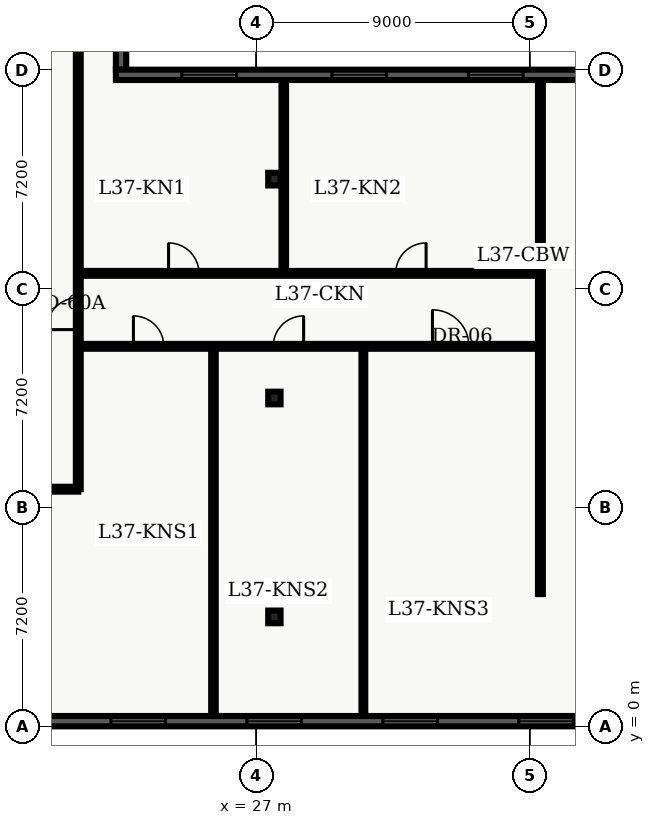
"""IFC4 building model, lengths in metres.
Left out: names, types, materials, properties, quantities, classifications, styles, units other than length and angle.
Written with IfcOpenShell. Run it as: python <this file> out.ifc"""

import sys

from ifc_helpers import new_model, entity, si_unit, converted_unit, direction, frame, origin_with_axes, origin_2d_with_axis, place, context, subcontext, project, spatial, polyline, rectangle, i_section, outline, extrude, element, fill, save


model = new_model("IFC4")
c1 = context("Model", 3, precision=1e-05, world=origin_with_axes(), true_north=direction((0.0, 1.0)))
c2 = subcontext(c1, "Body", "Model", "MODEL_VIEW")
j1 = project(units=[si_unit("LENGTHUNIT", "METRE"), converted_unit("PLANEANGLEUNIT", "DEGREE", entity("IfcPlaneAngleMeasure", 0.017), si_unit("PLANEANGLEUNIT", "RADIAN"), dimensions=[0, 0, 0, 0, 0, 0, 0])], contexts=[c1])
p1 = place(None, origin_with_axes())
s1 = spatial("IfcSite", under=j1, at=p1, CompositionType="ELEMENT")
p2 = place(p1, origin_with_axes())
s2 = spatial("IfcBuilding", under=s1, at=p2, CompositionType="ELEMENT")
p3 = place(p2, frame((0.0, 0.0, 152.4), z_axis=(0.0, 0.0, 1.0), x_axis=(1.0, 0.0, 0.0)))
s3 = spatial("IfcBuildingStorey", under=s2, at=p3, CompositionType="ELEMENT", Elevation=152.4)
for number, where, z_axis, x_axis in (
    (1, (27.6, 3.6, 0.0), (0.0, 0.0, 1.0), (1.0, 0.0, 0.0)),
    (2, (27.6, 10.8, 0.0), (0.0, 0.0, 1.0), (1.0, 0.0, 0.0)),
    (3, (27.6, 18.0, 0.0), (0.0, 0.0, 1.0), (1.0, 0.0, 0.0)),
):
    element("IfcColumn", number, at=place(p3, frame(where, z_axis=z_axis, x_axis=x_axis)), inside=s3, PredefinedType="COLUMN", context=c2, shape_type="SweptSolid", body=[
        extrude(i_section(OverallWidth=0.406, OverallDepth=0.416, WebThickness=0.03, FlangeThickness=0.048, FilletRadius=0.022, at=origin_2d_with_axis()), origin_with_axes(), (0.0, 0.0, 1.0), 3.9),
    ])
p4 = place(p3, frame((2.6, 7.8, 0.0), z_axis=(0.0, 0.0, 1.0), x_axis=(1.0, 0.0, 0.0)))
e4 = element("IfcWall", 4, at=p4, inside=s3, PredefinedType="PARTITIONING", context=c2, shape_type="SweptSolid", body=[
    extrude(outline(polyline([(0.0, -0.08), (18.55, -0.08), (18.55, 0.08), (0.0, 0.08), (0.0, -0.08)])), origin_with_axes(), (0.0, 0.0, 1.0), 2.7),
])
p5 = place(p4, frame((3.787, 0.0, 0.0), z_axis=(0.0, 0.0, 1.0), x_axis=(1.0, 0.0, 0.0)))
e5 = element("IfcOpeningElement", 5, at=p5, cuts=e4, PredefinedType="OPENING", context=c2, shape_type="SweptSolid", body=[
    extrude(rectangle(XDim=1.0, YDim=0.18, at=origin_2d_with_axis()), origin_with_axes(), (0.0, 0.0, 1.0), 2.15),
])
p6 = place(p4, frame((13.322, 0.0, 0.0), z_axis=(0.0, 0.0, 1.0), x_axis=(1.0, 0.0, 0.0)))
e6 = element("IfcOpeningElement", 6, at=p6, cuts=e4, PredefinedType="OPENING", context=c2, shape_type="SweptSolid", body=[
    extrude(rectangle(XDim=1.0, YDim=0.18, at=origin_2d_with_axis()), origin_with_axes(), (0.0, 0.0, 1.0), 2.15),
])
p7 = place(p3, frame((21.15, 7.8, 0.0), z_axis=(0.0, 0.0, 1.0), x_axis=(0.0, 1.0, 0.0)))
e7 = element("IfcWall", 7, at=p7, inside=s3, PredefinedType="PARTITIONING", context=c2, shape_type="SweptSolid", body=[
    extrude(outline(polyline([(0.0, -0.08), (32.7, -0.08), (32.7, 0.08), (0.0, 0.08), (0.0, -0.08)])), origin_with_axes(), (0.0, 0.0, 1.0), 2.7),
])
p8 = place(p7, frame((5.775, 0.0, 0.0), z_axis=(0.0, 0.0, 1.0), x_axis=(1.0, 0.0, 0.0)))
e8 = element("IfcOpeningElement", 8, at=p8, cuts=e7, PredefinedType="OPENING", context=c2, shape_type="SweptSolid", body=[
    extrude(rectangle(XDim=1.05, YDim=0.18, at=origin_2d_with_axis()), origin_with_axes(), (0.0, 0.0, 1.0), 2.15),
])
p9 = place(p3, frame((21.15, 12.5, 0.0), z_axis=(0.0, 0.0, 1.0), x_axis=(1.0, 0.0, 0.0)))
e9 = element("IfcWall", 9, at=p9, inside=s3, PredefinedType="PARTITIONING", context=c2, shape_type="SweptSolid", body=[
    extrude(outline(polyline([(0.0, -0.08), (15.2, -0.08), (15.2, 0.08), (0.0, 0.08), (0.0, -0.08)])), origin_with_axes(), (0.0, 0.0, 1.0), 2.7),
])
p10 = place(p9, frame((2.313, 0.0, 0.0), z_axis=(0.0, 0.0, 1.0), x_axis=(1.0, 0.0, 0.0)))
e10 = element("IfcOpeningElement", 10, at=p10, cuts=e9, PredefinedType="OPENING", context=c2, shape_type="SweptSolid", body=[
    extrude(rectangle(XDim=1.0, YDim=0.18, at=origin_2d_with_axis()), origin_with_axes(), (0.0, 0.0, 1.0), 2.15),
])
p11 = place(p9, frame((6.912, 0.0, 0.0), z_axis=(0.0, 0.0, 1.0), x_axis=(1.0, 0.0, 0.0)))
e11 = element("IfcOpeningElement", 11, at=p11, cuts=e9, PredefinedType="OPENING", context=c2, shape_type="SweptSolid", body=[
    extrude(rectangle(XDim=1.0, YDim=0.18, at=origin_2d_with_axis()), origin_with_axes(), (0.0, 0.0, 1.0), 2.15),
])
p12 = place(p9, frame((12.248, 0.0, 0.0), z_axis=(0.0, 0.0, 1.0), x_axis=(1.0, 0.0, 0.0)))
e12 = element("IfcOpeningElement", 12, at=p12, cuts=e9, PredefinedType="OPENING", context=c2, shape_type="SweptSolid", body=[
    extrude(rectangle(XDim=1.2, YDim=0.18, at=origin_2d_with_axis()), origin_with_axes(), (0.0, 0.0, 1.0), 2.2),
])
p13 = place(p3, frame((21.15, 14.9, 0.0), z_axis=(0.0, 0.0, 1.0), x_axis=(1.0, 0.0, 0.0)))
e13 = element("IfcWall", 13, at=p13, inside=s3, PredefinedType="PARTITIONING", context=c2, shape_type="SweptSolid", body=[
    extrude(outline(polyline([(0.0, -0.08), (15.2, -0.08), (15.2, 0.08), (0.0, 0.08), (0.0, -0.08)])), origin_with_axes(), (0.0, 0.0, 1.0), 2.7),
])
p14 = place(p13, frame((3.47, 0.0, 0.0), z_axis=(0.0, 0.0, 1.0), x_axis=(1.0, 0.0, 0.0)))
e14 = element("IfcOpeningElement", 14, at=p14, cuts=e13, PredefinedType="OPENING", context=c2, shape_type="SweptSolid", body=[
    extrude(rectangle(XDim=1.0, YDim=0.18, at=origin_2d_with_axis()), origin_with_axes(), (0.0, 0.0, 1.0), 2.15),
])
p15 = place(p13, frame((10.94, 0.0, 0.0), z_axis=(0.0, 0.0, 1.0), x_axis=(1.0, 0.0, 0.0)))
e15 = element("IfcOpeningElement", 15, at=p15, cuts=e13, PredefinedType="OPENING", context=c2, shape_type="SweptSolid", body=[
    extrude(rectangle(XDim=1.0, YDim=0.18, at=origin_2d_with_axis()), origin_with_axes(), (0.0, 0.0, 1.0), 2.15),
])
p16 = place(p3, frame((36.35, 4.35, 0.0), z_axis=(0.0, 0.0, 1.0), x_axis=(0.0, 1.0, 0.0)))
e16 = element("IfcWall", 16, at=p16, inside=s3, PredefinedType="PARTITIONING", context=c2, shape_type="SweptSolid", body=[
    extrude(outline(polyline([(0.0, -0.08), (16.95, -0.08), (16.95, 0.08), (0.0, 0.08), (0.0, -0.08)])), origin_with_axes(), (0.0, 0.0, 1.0), 2.7),
])
p17 = place(p3, frame((25.596, 0.335, 0.0), z_axis=(0.0, 0.0, 1.0), x_axis=(0.0, 1.0, 0.0)))
e17 = element("IfcWall", 17, at=p17, inside=s3, PredefinedType="PARTITIONING", context=c2, shape_type="SweptSolid", body=[
    extrude(outline(polyline([(0.0, -0.075), (12.045, -0.075), (12.045, 0.075), (0.0, 0.075), (0.0, -0.075)])), origin_with_axes(), (0.0, 0.0, 1.0), 2.7),
])
p18 = place(p3, frame((30.527, 0.335, 0.0), z_axis=(0.0, 0.0, 1.0), x_axis=(0.0, 1.0, 0.0)))
e18 = element("IfcWall", 18, at=p18, inside=s3, PredefinedType="PARTITIONING", context=c2, shape_type="SweptSolid", body=[
    extrude(outline(polyline([(0.0, -0.062), (12.045, -0.062), (12.045, 0.062), (0.0, 0.062), (0.0, -0.062)])), origin_with_axes(), (0.0, 0.0, 1.0), 2.7),
])
p19 = place(p3, frame((27.909, 15.02, 0.0), z_axis=(0.0, 0.0, 1.0), x_axis=(0.0, 1.0, 0.0)))
e19 = element("IfcWall", 19, at=p19, inside=s3, PredefinedType="PARTITIONING", context=c2, shape_type="SweptSolid", body=[
    extrude(outline(polyline([(0.0, -0.075), (6.245, -0.075), (6.245, 0.075), (0.0, 0.075), (0.0, -0.075)])), origin_with_axes(), (0.0, 0.0, 1.0), 2.7),
])
p20 = place(p3, frame((57.26, 0.17, 0.0), z_axis=(0.0, 0.0, 1.0), x_axis=(-1.0, 0.0, 0.0)))
e20 = element("IfcWall", 20, at=p20, inside=s3, PredefinedType="SOLIDWALL", context=c2, shape_type="SweptSolid", body=[
    extrude(outline(polyline([(0.0, -0.17), (54.86, -0.17), (54.86, 0.17), (0.0, 0.17), (0.0, -0.17)])), origin_with_axes(), (0.0, 0.0, 1.0), 3.66),
])
p21 = place(p20, frame((2.836, 0.0, 0.45), z_axis=(0.0, 0.0, 1.0), x_axis=(1.0, 0.0, 0.0)))
e21 = element("IfcOpeningElement", 21, at=p21, cuts=e20, PredefinedType="OPENING", context=c2, shape_type="SweptSolid", body=[
    extrude(rectangle(XDim=1.8, YDim=0.36, at=origin_2d_with_axis()), origin_with_axes(), (0.0, 0.0, 1.0), 2.1),
])
p22 = place(p20, frame((7.307, 0.0, 0.45), z_axis=(0.0, 0.0, 1.0), x_axis=(1.0, 0.0, 0.0)))
e22 = element("IfcOpeningElement", 22, at=p22, cuts=e20, PredefinedType="OPENING", context=c2, shape_type="SweptSolid", body=[
    extrude(rectangle(XDim=1.8, YDim=0.36, at=origin_2d_with_axis()), origin_with_axes(), (0.0, 0.0, 1.0), 2.1),
])
p23 = place(p20, frame((11.779, 0.0, 0.45), z_axis=(0.0, 0.0, 1.0), x_axis=(1.0, 0.0, 0.0)))
e23 = element("IfcOpeningElement", 23, at=p23, cuts=e20, PredefinedType="OPENING", context=c2, shape_type="SweptSolid", body=[
    extrude(rectangle(XDim=1.8, YDim=0.36, at=origin_2d_with_axis()), origin_with_axes(), (0.0, 0.0, 1.0), 2.1),
])
p24 = place(p20, frame((16.251, 0.0, 0.45), z_axis=(0.0, 0.0, 1.0), x_axis=(1.0, 0.0, 0.0)))
e24 = element("IfcOpeningElement", 24, at=p24, cuts=e20, PredefinedType="OPENING", context=c2, shape_type="SweptSolid", body=[
    extrude(rectangle(XDim=1.8, YDim=0.36, at=origin_2d_with_axis()), origin_with_axes(), (0.0, 0.0, 1.0), 2.1),
])
p25 = place(p20, frame((20.723, 0.0, 0.45), z_axis=(0.0, 0.0, 1.0), x_axis=(1.0, 0.0, 0.0)))
e25 = element("IfcOpeningElement", 25, at=p25, cuts=e20, PredefinedType="OPENING", context=c2, shape_type="SweptSolid", body=[
    extrude(rectangle(XDim=1.8, YDim=0.36, at=origin_2d_with_axis()), origin_with_axes(), (0.0, 0.0, 1.0), 2.1),
])
p26 = place(p20, frame((25.194, 0.0, 0.45), z_axis=(0.0, 0.0, 1.0), x_axis=(1.0, 0.0, 0.0)))
e26 = element("IfcOpeningElement", 26, at=p26, cuts=e20, PredefinedType="OPENING", context=c2, shape_type="SweptSolid", body=[
    extrude(rectangle(XDim=1.8, YDim=0.36, at=origin_2d_with_axis()), origin_with_axes(), (0.0, 0.0, 1.0), 2.1),
])
p27 = place(p20, frame((29.666, 0.0, 0.45), z_axis=(0.0, 0.0, 1.0), x_axis=(1.0, 0.0, 0.0)))
e27 = element("IfcOpeningElement", 27, at=p27, cuts=e20, PredefinedType="OPENING", context=c2, shape_type="SweptSolid", body=[
    extrude(rectangle(XDim=1.8, YDim=0.36, at=origin_2d_with_axis()), origin_with_axes(), (0.0, 0.0, 1.0), 2.1),
])
p28 = place(p20, frame((34.138, 0.0, 0.45), z_axis=(0.0, 0.0, 1.0), x_axis=(1.0, 0.0, 0.0)))
e28 = element("IfcOpeningElement", 28, at=p28, cuts=e20, PredefinedType="OPENING", context=c2, shape_type="SweptSolid", body=[
    extrude(rectangle(XDim=1.8, YDim=0.36, at=origin_2d_with_axis()), origin_with_axes(), (0.0, 0.0, 1.0), 2.1),
])
p29 = place(p20, frame((38.609, 0.0, 0.45), z_axis=(0.0, 0.0, 1.0), x_axis=(1.0, 0.0, 0.0)))
e29 = element("IfcOpeningElement", 29, at=p29, cuts=e20, PredefinedType="OPENING", context=c2, shape_type="SweptSolid", body=[
    extrude(rectangle(XDim=1.8, YDim=0.36, at=origin_2d_with_axis()), origin_with_axes(), (0.0, 0.0, 1.0), 2.1),
])
p30 = place(p20, frame((43.081, 0.0, 0.45), z_axis=(0.0, 0.0, 1.0), x_axis=(1.0, 0.0, 0.0)))
e30 = element("IfcOpeningElement", 30, at=p30, cuts=e20, PredefinedType="OPENING", context=c2, shape_type="SweptSolid", body=[
    extrude(rectangle(XDim=1.8, YDim=0.36, at=origin_2d_with_axis()), origin_with_axes(), (0.0, 0.0, 1.0), 2.1),
])
p31 = place(p20, frame((48.003, 0.0, 0.45), z_axis=(0.0, 0.0, 1.0), x_axis=(1.0, 0.0, 0.0)))
e31 = element("IfcOpeningElement", 31, at=p31, cuts=e20, PredefinedType="OPENING", context=c2, shape_type="SweptSolid", body=[
    extrude(rectangle(XDim=1.8, YDim=0.36, at=origin_2d_with_axis()), origin_with_axes(), (0.0, 0.0, 1.0), 2.1),
])
p32 = place(p20, frame((52.024, 0.0, 0.45), z_axis=(0.0, 0.0, 1.0), x_axis=(1.0, 0.0, 0.0)))
e32 = element("IfcOpeningElement", 32, at=p32, cuts=e20, PredefinedType="OPENING", context=c2, shape_type="SweptSolid", body=[
    extrude(rectangle(XDim=1.8, YDim=0.36, at=origin_2d_with_axis()), origin_with_axes(), (0.0, 0.0, 1.0), 2.1),
])
p33 = place(p3, frame((22.557, 46.1, 0.0), z_axis=(0.0, 0.0, 1.0), x_axis=(0.0, -1.0, 0.0)))
e33 = element("IfcWall", 33, at=p33, inside=s3, PredefinedType="SOLIDWALL", context=c2, shape_type="SweptSolid", body=[
    extrude(outline(polyline([(0.0, -0.17), (24.5, -0.17), (24.5, 0.17), (0.0, 0.17), (0.0, -0.17)])), origin_with_axes(), (0.0, 0.0, 1.0), 3.66),
])
p34 = place(p33, frame((2.93, 0.0, 0.45), z_axis=(0.0, 0.0, 1.0), x_axis=(1.0, 0.0, 0.0)))
e34 = element("IfcOpeningElement", 34, at=p34, cuts=e33, PredefinedType="OPENING", context=c2, shape_type="SweptSolid", body=[
    extrude(rectangle(XDim=1.6, YDim=0.36, at=origin_2d_with_axis()), origin_with_axes(), (0.0, 0.0, 1.0), 2.2),
])
p35 = place(p33, frame((7.59, 0.0, 0.45), z_axis=(0.0, 0.0, 1.0), x_axis=(1.0, 0.0, 0.0)))
e35 = element("IfcOpeningElement", 35, at=p35, cuts=e33, PredefinedType="OPENING", context=c2, shape_type="SweptSolid", body=[
    extrude(rectangle(XDim=1.6, YDim=0.36, at=origin_2d_with_axis()), origin_with_axes(), (0.0, 0.0, 1.0), 2.2),
])
p36 = place(p33, frame((12.25, 0.0, 0.45), z_axis=(0.0, 0.0, 1.0), x_axis=(1.0, 0.0, 0.0)))
e36 = element("IfcOpeningElement", 36, at=p36, cuts=e33, PredefinedType="OPENING", context=c2, shape_type="SweptSolid", body=[
    extrude(rectangle(XDim=1.6, YDim=0.36, at=origin_2d_with_axis()), origin_with_axes(), (0.0, 0.0, 1.0), 2.2),
])
p37 = place(p33, frame((16.91, 0.0, 0.45), z_axis=(0.0, 0.0, 1.0), x_axis=(1.0, 0.0, 0.0)))
e37 = element("IfcOpeningElement", 37, at=p37, cuts=e33, PredefinedType="OPENING", context=c2, shape_type="SweptSolid", body=[
    extrude(rectangle(XDim=1.6, YDim=0.36, at=origin_2d_with_axis()), origin_with_axes(), (0.0, 0.0, 1.0), 2.2),
])
p38 = place(p33, frame((21.57, 0.0, 0.45), z_axis=(0.0, 0.0, 1.0), x_axis=(1.0, 0.0, 0.0)))
e38 = element("IfcOpeningElement", 38, at=p38, cuts=e33, PredefinedType="OPENING", context=c2, shape_type="SweptSolid", body=[
    extrude(rectangle(XDim=1.6, YDim=0.36, at=origin_2d_with_axis()), origin_with_axes(), (0.0, 0.0, 1.0), 2.2),
])
p39 = place(p3, frame((22.387, 21.43, 0.0), z_axis=(0.0, 0.0, 1.0), x_axis=(1.0, 0.0, 0.0)))
e39 = element("IfcWall", 39, at=p39, inside=s3, PredefinedType="SOLIDWALL", context=c2, shape_type="SweptSolid", body=[
    extrude(outline(polyline([(0.0, -0.17), (16.013, -0.17), (16.013, 0.17), (0.0, 0.17), (0.0, -0.17)])), origin_with_axes(), (0.0, 0.0, 1.0), 3.66),
])
p40 = place(p39, frame((3.069, 0.0, 0.45), z_axis=(0.0, 0.0, 1.0), x_axis=(1.0, 0.0, 0.0)))
e40 = element("IfcOpeningElement", 40, at=p40, cuts=e39, PredefinedType="OPENING", context=c2, shape_type="SweptSolid", body=[
    extrude(rectangle(XDim=1.8, YDim=0.36, at=origin_2d_with_axis()), origin_with_axes(), (0.0, 0.0, 1.0), 2.1),
])
p41 = place(p39, frame((8.006, 0.0, 0.45), z_axis=(0.0, 0.0, 1.0), x_axis=(1.0, 0.0, 0.0)))
e41 = element("IfcOpeningElement", 41, at=p41, cuts=e39, PredefinedType="OPENING", context=c2, shape_type="SweptSolid", body=[
    extrude(rectangle(XDim=1.8, YDim=0.36, at=origin_2d_with_axis()), origin_with_axes(), (0.0, 0.0, 1.0), 2.1),
])
p42 = place(p39, frame((12.494, 0.0, 0.45), z_axis=(0.0, 0.0, 1.0), x_axis=(1.0, 0.0, 0.0)))
e42 = element("IfcOpeningElement", 42, at=p42, cuts=e39, PredefinedType="OPENING", context=c2, shape_type="SweptSolid", body=[
    extrude(rectangle(XDim=1.8, YDim=0.36, at=origin_2d_with_axis()), origin_with_axes(), (0.0, 0.0, 1.0), 2.1),
])
p43 = place(p7, frame((5.775, 0.0, 0.0), z_axis=(0.0, 0.0, 1.0), x_axis=(1.0, 0.0, 0.0)))
e43 = element("IfcDoor", 43, at=p43, inside=s3, OperationType="SINGLE_SWING_LEFT", PredefinedType="DOOR", context=c2, shape_type="SweptSolid", body=[
    extrude(rectangle(XDim=1.05, YDim=0.09, at=origin_2d_with_axis()), origin_with_axes(), (0.0, 0.0, 1.0), 2.15),
])
fill(e8, e43)
p44 = place(p9, frame((2.313, 0.0, 0.0), z_axis=(0.0, 0.0, 1.0), x_axis=(1.0, 0.0, 0.0)))
e44 = element("IfcDoor", 44, at=p44, inside=s3, OperationType="SINGLE_SWING_LEFT", PredefinedType="DOOR", context=c2, shape_type="SweptSolid", body=[
    extrude(rectangle(XDim=1.0, YDim=0.09, at=origin_2d_with_axis()), origin_with_axes(), (0.0, 0.0, 1.0), 2.15),
])
fill(e10, e44)
p45 = place(p9, frame((6.912, 0.0, 0.0), z_axis=(0.0, 0.0, 1.0), x_axis=(1.0, 0.0, 0.0)))
e45 = element("IfcDoor", 45, at=p45, inside=s3, OperationType="SINGLE_SWING_RIGHT", PredefinedType="DOOR", context=c2, shape_type="SweptSolid", body=[
    extrude(rectangle(XDim=1.0, YDim=0.09, at=origin_2d_with_axis()), origin_with_axes(), (0.0, 0.0, 1.0), 2.15),
])
fill(e11, e45)
p46 = place(p9, frame((12.248, 0.0, 0.0), z_axis=(0.0, 0.0, 1.0), x_axis=(1.0, 0.0, 0.0)))
e46 = element("IfcDoor", 46, at=p46, inside=s3, OperationType="SINGLE_SWING_LEFT", PredefinedType="DOOR", context=c2, shape_type="SweptSolid", body=[
    extrude(rectangle(XDim=1.2, YDim=0.09, at=origin_2d_with_axis()), origin_with_axes(), (0.0, 0.0, 1.0), 2.2),
])
fill(e12, e46)
p47 = place(p13, frame((3.47, 0.0, 0.0), z_axis=(0.0, 0.0, 1.0), x_axis=(1.0, 0.0, 0.0)))
e47 = element("IfcDoor", 47, at=p47, inside=s3, OperationType="SINGLE_SWING_LEFT", PredefinedType="DOOR", context=c2, shape_type="SweptSolid", body=[
    extrude(rectangle(XDim=1.0, YDim=0.09, at=origin_2d_with_axis()), origin_with_axes(), (0.0, 0.0, 1.0), 2.15),
])
fill(e14, e47)
p48 = place(p13, frame((10.94, 0.0, 0.0), z_axis=(0.0, 0.0, 1.0), x_axis=(1.0, 0.0, 0.0)))
e48 = element("IfcDoor", 48, at=p48, inside=s3, OperationType="SINGLE_SWING_RIGHT", PredefinedType="DOOR", context=c2, shape_type="SweptSolid", body=[
    extrude(rectangle(XDim=1.0, YDim=0.09, at=origin_2d_with_axis()), origin_with_axes(), (0.0, 0.0, 1.0), 2.15),
])
fill(e15, e48)
p49 = place(p20, frame((20.723, 0.0, 0.45), z_axis=(0.0, 0.0, 1.0), x_axis=(1.0, 0.0, 0.0)))
e49 = element("IfcWindow", 49, at=p49, inside=s3, PredefinedType="WINDOW", context=c2, shape_type="SweptSolid", body=[
    extrude(rectangle(XDim=1.8, YDim=0.09, at=origin_2d_with_axis()), origin_with_axes(), (0.0, 0.0, 1.0), 2.1),
])
fill(e25, e49)
p50 = place(p20, frame((25.194, 0.0, 0.45), z_axis=(0.0, 0.0, 1.0), x_axis=(1.0, 0.0, 0.0)))
e50 = element("IfcWindow", 50, at=p50, inside=s3, PredefinedType="WINDOW", context=c2, shape_type="SweptSolid", body=[
    extrude(rectangle(XDim=1.8, YDim=0.09, at=origin_2d_with_axis()), origin_with_axes(), (0.0, 0.0, 1.0), 2.1),
])
fill(e26, e50)
p51 = place(p20, frame((29.666, 0.0, 0.45), z_axis=(0.0, 0.0, 1.0), x_axis=(1.0, 0.0, 0.0)))
e51 = element("IfcWindow", 51, at=p51, inside=s3, PredefinedType="WINDOW", context=c2, shape_type="SweptSolid", body=[
    extrude(rectangle(XDim=1.8, YDim=0.09, at=origin_2d_with_axis()), origin_with_axes(), (0.0, 0.0, 1.0), 2.1),
])
fill(e27, e51)
p52 = place(p20, frame((34.138, 0.0, 0.45), z_axis=(0.0, 0.0, 1.0), x_axis=(1.0, 0.0, 0.0)))
e52 = element("IfcWindow", 52, at=p52, inside=s3, PredefinedType="WINDOW", context=c2, shape_type="SweptSolid", body=[
    extrude(rectangle(XDim=1.8, YDim=0.09, at=origin_2d_with_axis()), origin_with_axes(), (0.0, 0.0, 1.0), 2.1),
])
fill(e28, e52)
p53 = place(p39, frame((3.069, 0.0, 0.45), z_axis=(0.0, 0.0, 1.0), x_axis=(1.0, 0.0, 0.0)))
e53 = element("IfcWindow", 53, at=p53, inside=s3, PredefinedType="WINDOW", context=c2, shape_type="SweptSolid", body=[
    extrude(rectangle(XDim=1.8, YDim=0.09, at=origin_2d_with_axis()), origin_with_axes(), (0.0, 0.0, 1.0), 2.1),
])
fill(e40, e53)
p54 = place(p39, frame((8.006, 0.0, 0.45), z_axis=(0.0, 0.0, 1.0), x_axis=(1.0, 0.0, 0.0)))
e54 = element("IfcWindow", 54, at=p54, inside=s3, PredefinedType="WINDOW", context=c2, shape_type="SweptSolid", body=[
    extrude(rectangle(XDim=1.8, YDim=0.09, at=origin_2d_with_axis()), origin_with_axes(), (0.0, 0.0, 1.0), 2.1),
])
fill(e41, e54)
p55 = place(p39, frame((12.494, 0.0, 0.45), z_axis=(0.0, 0.0, 1.0), x_axis=(1.0, 0.0, 0.0)))
e55 = element("IfcWindow", 55, at=p55, inside=s3, PredefinedType="WINDOW", context=c2, shape_type="SweptSolid", body=[
    extrude(rectangle(XDim=1.8, YDim=0.09, at=origin_2d_with_axis()), origin_with_axes(), (0.0, 0.0, 1.0), 2.1),
])
fill(e42, e55)
save(model, sys.argv[1])
